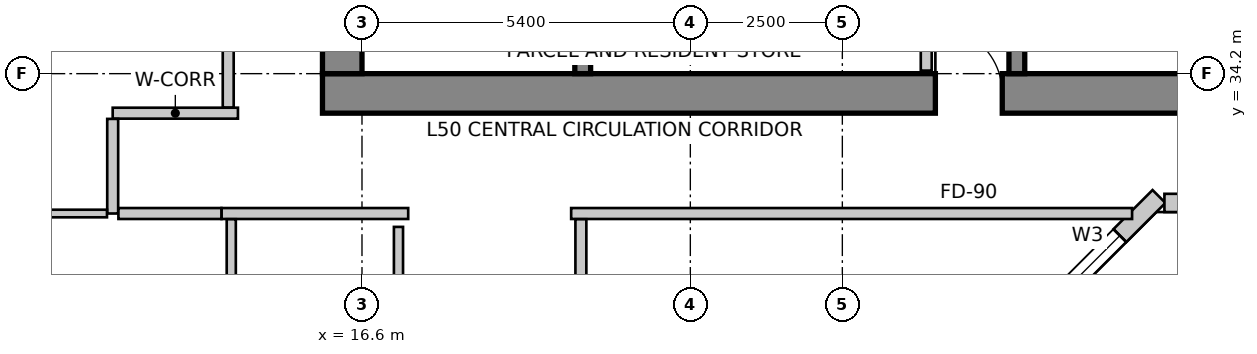
"""IFC4 building model, lengths in metres.
Left out: names, types, materials, properties, quantities, classifications, styles, units other than length and angle.
Written with IfcOpenShell. Run it as: python <this file> out.ifc"""

import sys

from ifc_helpers import new_model, si_unit, direction, frame, frame_2d, origin, place, context, subcontext, project, spatial, rectangle, extrude, source, transform, mapped, element, fill, save


model = new_model("IFC4")
c1 = context("Model", 3, precision=1e-05, world=origin(), true_north=direction((0.0, 1.0)))
c2 = subcontext(c1, "Body", "Model", "MODEL_VIEW")
j1 = project(units=[si_unit("LENGTHUNIT", "METRE"), si_unit("PLANEANGLEUNIT", "RADIAN")], contexts=[c1])
p1 = place(None, origin())
s1 = spatial("IfcSite", under=j1, at=p1, CompositionType="ELEMENT")
p2 = place(p1, origin())
s2 = spatial("IfcBuilding", under=s1, at=p2, CompositionType="ELEMENT")
p3 = place(p2, frame((0.0, 0.0, 200.9)))
s3 = spatial("IfcBuildingStorey", under=s2, at=p3, CompositionType="ELEMENT", Elevation=200.9)
p4 = place(p3, frame((15.95, 33.875, 0.0), z_axis=(0.0, 0.0, 1.0), x_axis=(1.0, 0.0, 0.0)))
e1 = element("IfcWall", 1, at=p4, inside=s3, PredefinedType="SHEAR", context=c2, shape_type="SweptSolid", body=[
    extrude(rectangle(XDim=15.7, YDim=0.65, at=frame_2d((7.85, 0.0))), origin(), (0.0, 0.0, 1.0), 3.5),
])
m1 = source(origin(), c2, "Body", "SweptSolid", [
    extrude(rectangle(XDim=1.1, YDim=2.15, at=frame_2d((0.55, 1.075))), frame((0.0, 0.335, 0.0), z_axis=(0.0, -1.0, 0.0), x_axis=(1.0, 0.0, 0.0)), (0.0, 0.0, 1.0), 0.67),
])
p5 = place(p4, frame((10.08, 0.0, 0.0)))
e2 = element("IfcOpeningElement", 2, at=p5, cuts=e1, PredefinedType="OPENING", context=c2, shape_type="MappedRepresentation", body=[
    mapped(m1, transform((0.0, 0.0, 0.0), scale=1.0)),
])
p6 = place(p3, frame((16.275, 34.2, 0.0), z_axis=(0.0, 0.0, 1.0), x_axis=(0.0, 1.0, 0.0)))
e3 = element("IfcWall", 3, at=p6, inside=s3, PredefinedType="SHEAR", context=c2, shape_type="SweptSolid", body=[
    extrude(rectangle(XDim=11.4, YDim=0.65, at=frame_2d((5.7, 0.0))), origin(), (0.0, 0.0, 1.0), 3.5),
])
p7 = place(p6, frame((7.15, 0.0, 0.0)))
e4 = element("IfcOpeningElement", 4, at=p7, cuts=e3, PredefinedType="OPENING", context=c2, shape_type="MappedRepresentation", body=[
    mapped(m1, transform((0.0, 0.0, 0.0), scale=1.0)),
])
p8 = place(p3, frame((20.23, 34.2, 0.0), z_axis=(0.0, 0.0, 1.0), x_axis=(0.0, 1.0, 0.0)))
e5 = element("IfcWall", 5, at=p8, inside=s3, PredefinedType="SHEAR", context=c2, shape_type="SweptSolid", body=[
    extrude(rectangle(XDim=9.06, YDim=0.26, at=frame_2d((4.53, 0.0))), origin(), (0.0, 0.0, 1.0), 3.5),
])
m2 = source(origin(), c2, "Body", "SweptSolid", [
    extrude(rectangle(XDim=1.1, YDim=2.15, at=frame_2d((0.55, 1.075))), frame((0.0, 0.14, 0.0), z_axis=(0.0, -1.0, 0.0), x_axis=(1.0, 0.0, 0.0)), (0.0, 0.0, 1.0), 0.28),
])
p9 = place(p8, frame((7.45, 0.0, 0.0)))
e6 = element("IfcOpeningElement", 6, at=p9, cuts=e5, PredefinedType="OPENING", context=c2, shape_type="MappedRepresentation", body=[
    mapped(m2, transform((0.0, 0.0, 0.0), scale=1.0)),
])
p10 = place(p3, frame((27.37, 34.2, 0.0), z_axis=(0.0, 0.0, 1.0), x_axis=(0.0, 1.0, 0.0)))
e7 = element("IfcWall", 7, at=p10, inside=s3, PredefinedType="SHEAR", context=c2, shape_type="SweptSolid", body=[
    extrude(rectangle(XDim=9.06, YDim=0.26, at=frame_2d((4.53, 0.0))), origin(), (0.0, 0.0, 1.0), 3.5),
])
p11 = place(p10, frame((7.45, 0.0, 0.0)))
e8 = element("IfcOpeningElement", 8, at=p11, cuts=e7, PredefinedType="OPENING", context=c2, shape_type="MappedRepresentation", body=[
    mapped(m2, transform((0.0, 0.0, 0.0), scale=1.0)),
])
p12 = place(p3, frame((27.652, 30.124, 0.0), z_axis=(0.0, 0.0, 1.0), x_axis=(0.707064797706, 0.707148762175, 0.0)))
e9 = element("IfcWall", 9, at=p12, inside=s3, PredefinedType="SOLIDWALL", context=c2, shape_type="SweptSolid", body=[
    extrude(rectangle(XDim=2.908, YDim=0.3, at=frame_2d((1.454, 0.0))), origin(), (0.0, 0.0, 1.0), 3.25),
])
m3 = source(origin(), c2, "Body", "SweptSolid", [
    extrude(rectangle(XDim=1.5, YDim=1.8, at=frame_2d((0.75, 0.9))), frame((0.0, 0.16, 0.0), z_axis=(0.0, -1.0, 0.0), x_axis=(1.0, 0.0, 0.0)), (0.0, 0.0, 1.0), 0.32),
])
p13 = place(p12, frame((0.498, 0.0, 0.85)))
e10 = element("IfcOpeningElement", 10, at=p13, cuts=e9, PredefinedType="OPENING", context=c2, shape_type="MappedRepresentation", body=[
    mapped(m3, transform((0.0, 0.0, 0.0), scale=1.0)),
])
p14 = place(p3, frame((29.797, 32.074, 0.0), z_axis=(0.0, 0.0, 1.0), x_axis=(1.0, 0.0, 0.0)))
e11 = element("IfcWall", 11, at=p14, inside=s3, PredefinedType="SOLIDWALL", context=c2, shape_type="SweptSolid", body=[
    extrude(rectangle(XDim=0.882, YDim=0.3, at=frame_2d((0.441, 0.0))), origin(), (0.0, 0.0, 1.0), 3.25),
])
p15 = place(p3, frame((13.269, 47.134, 0.0), z_axis=(0.0, 0.0, 1.0), x_axis=(-0.319920776449, -0.947444297464, 0.0)))
e12 = element("IfcWall", 12, at=p15, inside=s3, PredefinedType="SOLIDWALL", context=c2, shape_type="SweptSolid", body=[
    extrude(rectangle(XDim=16.133, YDim=0.3, at=frame_2d((8.067, 0.0))), origin(), (0.0, 0.0, 1.0), 3.25),
])
m4 = source(origin(), c2, "Body", "SweptSolid", [
    extrude(rectangle(XDim=2.4, YDim=2.2, at=frame_2d((1.2, 1.1))), frame((0.0, 0.16, 0.0), z_axis=(0.0, -1.0, 0.0), x_axis=(1.0, 0.0, 0.0)), (0.0, 0.0, 1.0), 0.32),
])
p16 = place(p15, frame((2.363, 0.0, 0.85)))
e13 = element("IfcOpeningElement", 13, at=p16, cuts=e12, PredefinedType="OPENING", context=c2, shape_type="MappedRepresentation", body=[
    mapped(m4, transform((0.0, 0.0, 0.0), scale=1.0)),
])
m5 = source(origin(), c2, "Body", "SweptSolid", [
    extrude(rectangle(XDim=2.1, YDim=2.0, at=frame_2d((1.05, 1.0))), frame((0.0, 0.16, 0.0), z_axis=(0.0, -1.0, 0.0), x_axis=(1.0, 0.0, 0.0)), (0.0, 0.0, 1.0), 0.32),
])
p17 = place(p15, frame((7.41, 0.0, 0.85)))
e14 = element("IfcOpeningElement", 14, at=p17, cuts=e12, PredefinedType="OPENING", context=c2, shape_type="MappedRepresentation", body=[
    mapped(m5, transform((0.0, 0.0, 0.0), scale=1.0)),
])
p18 = place(p15, frame((12.157, 0.0, 0.85)))
e15 = element("IfcOpeningElement", 15, at=p18, cuts=e12, PredefinedType="OPENING", context=c2, shape_type="MappedRepresentation", body=[
    mapped(m4, transform((0.0, 0.0, 0.0), scale=1.0)),
])
p19 = place(p3, frame((8.188, 31.834, 0.0), z_axis=(0.0, 0.0, 1.0), x_axis=(0.202303475707, -0.979322880217, 0.0)))
e16 = element("IfcWall", 16, at=p19, inside=s3, PredefinedType="SOLIDWALL", context=c2, shape_type="SweptSolid", body=[
    extrude(rectangle(XDim=15.766, YDim=0.3, at=frame_2d((7.883, 0.0))), origin(), (0.0, 0.0, 1.0), 3.25),
])
p20 = place(p19, frame((2.399, 0.0, 0.85)))
e17 = element("IfcOpeningElement", 17, at=p20, cuts=e16, PredefinedType="OPENING", context=c2, shape_type="MappedRepresentation", body=[
    mapped(m5, transform((0.0, 0.0, 0.0), scale=1.0)),
])
p21 = place(p19, frame((8.798, 0.0, 0.85)))
e18 = element("IfcOpeningElement", 18, at=p21, cuts=e16, PredefinedType="OPENING", context=c2, shape_type="MappedRepresentation", body=[
    mapped(m5, transform((0.0, 0.0, 0.0), scale=1.0)),
])
m6 = source(origin(), c2, "Body", "SweptSolid", [
    extrude(rectangle(XDim=1.2, YDim=1.6, at=frame_2d((0.6, 0.8))), frame((0.0, 0.16, 0.0), z_axis=(0.0, -1.0, 0.0), x_axis=(1.0, 0.0, 0.0)), (0.0, 0.0, 1.0), 0.32),
])
p22 = place(p19, frame((14.052, 0.0, 0.85)))
e19 = element("IfcOpeningElement", 19, at=p22, cuts=e16, PredefinedType="OPENING", context=c2, shape_type="MappedRepresentation", body=[
    mapped(m6, transform((0.0, 0.0, 0.0), scale=1.0)),
])
p23 = place(p3, frame((25.88, 35.956, 0.0), z_axis=(0.0, 0.0, 1.0), x_axis=(0.0, -1.0, 0.0)))
e20 = element("IfcWall", 20, at=p23, inside=s3, PredefinedType="PARTITIONING", context=c2, shape_type="SweptSolid", body=[
    extrude(rectangle(XDim=1.706, YDim=0.18, at=frame_2d((0.853, 0.0))), origin(), (0.0, 0.0, 1.0), 2.542),
])
p24 = place(p3, frame((12.5, 33.55, 0.0), z_axis=(0.0, 0.0, 1.0), x_axis=(1.0, 0.0, 0.0)))
e21 = element("IfcWall", 21, at=p24, inside=s3, PredefinedType="PARTITIONING", context=c2, shape_type="SweptSolid", body=[
    extrude(rectangle(XDim=2.06, YDim=0.18, at=frame_2d((1.03, 0.0))), origin(), (0.0, 0.0, 1.0), 3.25),
])
p25 = place(p3, frame((12.5, 31.9, 0.0), z_axis=(0.0, 0.0, 1.0), x_axis=(0.0, 1.0, 0.0)))
e22 = element("IfcWall", 22, at=p25, inside=s3, PredefinedType="PARTITIONING", context=c2, shape_type="SweptSolid", body=[
    extrude(rectangle(XDim=1.556, YDim=0.18, at=frame_2d((0.778, 0.0))), origin(), (0.0, 0.0, 1.0), 2.934),
])
p26 = place(p3, frame((17.36, 31.9, 0.0), z_axis=(0.0, 0.0, 1.0), x_axis=(-1.0, 0.0, 0.0)))
e23 = element("IfcWall", 23, at=p26, inside=s3, PredefinedType="PARTITIONING", context=c2, shape_type="SweptSolid", body=[
    extrude(rectangle(XDim=3.07, YDim=0.18, at=frame_2d((1.535, 0.0))), origin(), (0.0, 0.0, 1.0), 2.934),
])
p27 = place(p3, frame((14.288, 31.9, 0.0), z_axis=(0.0, 0.0, 1.0), x_axis=(-1.0, 0.0, 0.0)))
e24 = element("IfcWall", 24, at=p27, inside=s3, PredefinedType="PARTITIONING", context=c2, shape_type="SweptSolid", body=[
    extrude(rectangle(XDim=1.694, YDim=0.18, at=frame_2d((0.847, 0.0))), origin(), (0.0, 0.0, 1.0), 2.934),
])
p28 = place(p3, frame((29.265, 31.9, 0.0), z_axis=(0.0, 0.0, 1.0), x_axis=(-1.0, 0.0, 0.0)))
e25 = element("IfcWall", 25, at=p28, inside=s3, PredefinedType="PARTITIONING", context=c2, shape_type="SweptSolid", body=[
    extrude(rectangle(XDim=9.225, YDim=0.18, at=frame_2d((4.613, 0.0))), origin(), (0.0, 0.0, 1.0), 2.934),
])
p29 = place(p3, frame((14.4, 33.644, 0.0), z_axis=(0.0, 0.0, 1.0), x_axis=(0.0, 1.0, 0.0)))
e26 = element("IfcWall", 26, at=p29, inside=s3, PredefinedType="PARTITIONING", context=c2, shape_type="SweptSolid", body=[
    extrude(rectangle(XDim=12.606, YDim=0.18, at=frame_2d((6.303, 0.0))), origin(), (0.0, 0.0, 1.0), 3.25),
])
m7 = source(origin(), c2, "Body", "SweptSolid", [
    extrude(rectangle(XDim=0.9, YDim=2.15, at=frame_2d((0.45, 1.075))), frame((0.0, 0.1, 0.0), z_axis=(0.0, -1.0, 0.0), x_axis=(1.0, 0.0, 0.0)), (0.0, 0.0, 1.0), 0.2),
])
p30 = place(p29, frame((4.399, 0.0, 0.0)))
e27 = element("IfcOpeningElement", 27, at=p30, cuts=e26, PredefinedType="OPENING", context=c2, shape_type="MappedRepresentation", body=[
    mapped(m7, transform((0.0, 0.0, 0.0), scale=1.0)),
])
p31 = place(p3, frame((12.406, 31.9, 0.0), z_axis=(0.0, 0.0, 1.0), x_axis=(-1.0, 0.0, 0.0)))
e28 = element("IfcWall", 28, at=p31, inside=s3, PredefinedType="PARTITIONING", context=c2, shape_type="SweptSolid", body=[
    extrude(rectangle(XDim=4.115, YDim=0.125, at=frame_2d((2.057, 0.0))), origin(), (0.0, 0.0, 1.0), 2.542),
])
p32 = place(p3, frame((20.2, 31.806, 0.0), z_axis=(0.0, 0.0, 1.0), x_axis=(0.0, -1.0, 0.0)))
e29 = element("IfcWall", 29, at=p32, inside=s3, PredefinedType="PARTITIONING", context=c2, shape_type="SweptSolid", body=[
    extrude(rectangle(XDim=13.212, YDim=0.18, at=frame_2d((6.606, 0.0))), origin(), (0.0, 0.0, 1.0), 2.766),
])
p33 = place(p32, frame((6.095, 0.0, 0.0)))
e30 = element("IfcOpeningElement", 30, at=p33, cuts=e29, PredefinedType="OPENING", context=c2, shape_type="MappedRepresentation", body=[
    mapped(m7, transform((0.0, 0.0, 0.0), scale=1.0)),
])
p34 = place(p3, frame((14.45, 25.279, 0.0), z_axis=(0.0, 0.0, 1.0), x_axis=(0.0, 1.0, 0.0)))
e31 = element("IfcWall", 31, at=p34, inside=s3, PredefinedType="PARTITIONING", context=c2, shape_type="SweptSolid", body=[
    extrude(rectangle(XDim=6.527, YDim=0.15, at=frame_2d((3.263, 0.0))), origin(), (0.0, 0.0, 1.0), 2.766),
])
p35 = place(p3, frame((17.2, 31.68, 0.0), z_axis=(0.0, 0.0, 1.0), x_axis=(0.0, -1.0, 0.0)))
e32 = element("IfcWall", 32, at=p35, inside=s3, PredefinedType="PARTITIONING", context=c2, shape_type="SweptSolid", body=[
    extrude(rectangle(XDim=6.26, YDim=0.15, at=frame_2d((3.13, 0.0))), origin(), (0.0, 0.0, 1.0), 2.766),
])
m8 = source(origin(), c2, "Body", "SweptSolid", [
    extrude(rectangle(XDim=1.5, YDim=1.8, at=frame_2d((0.75, 0.9))), frame((0.0, -0.015, 0.0), z_axis=(0.0, -1.0, 0.0), x_axis=(1.0, 0.0, 0.0)), (0.0, 0.0, 1.0), 0.06),
])
p36 = place(p13, origin())
e33 = element("IfcWindow", 33, at=p36, inside=s3, PartitioningType="SINGLE_PANEL", PredefinedType="WINDOW", context=c2, shape_type="MappedRepresentation", body=[
    mapped(m8, transform((0.0, 0.0, 0.0), scale=1.0)),
])
fill(e10, e33)
m9 = source(origin(), c2, "Body", "SweptSolid", [
    extrude(rectangle(XDim=1.1, YDim=2.15, at=frame_2d((0.55, 1.075))), frame((0.0, 0.025, 0.0), z_axis=(0.0, -1.0, 0.0), x_axis=(1.0, 0.0, 0.0)), (0.0, 0.0, 1.0), 0.05),
])
p37 = place(p5, origin())
e34 = element("IfcDoor", 34, at=p37, inside=s3, OperationType="SINGLE_SWING_LEFT", PredefinedType="DOOR", context=c2, shape_type="MappedRepresentation", body=[
    mapped(m9, transform((0.0, 0.0, 0.0), scale=1.0)),
])
fill(e2, e34)
save(model, sys.argv[1])
